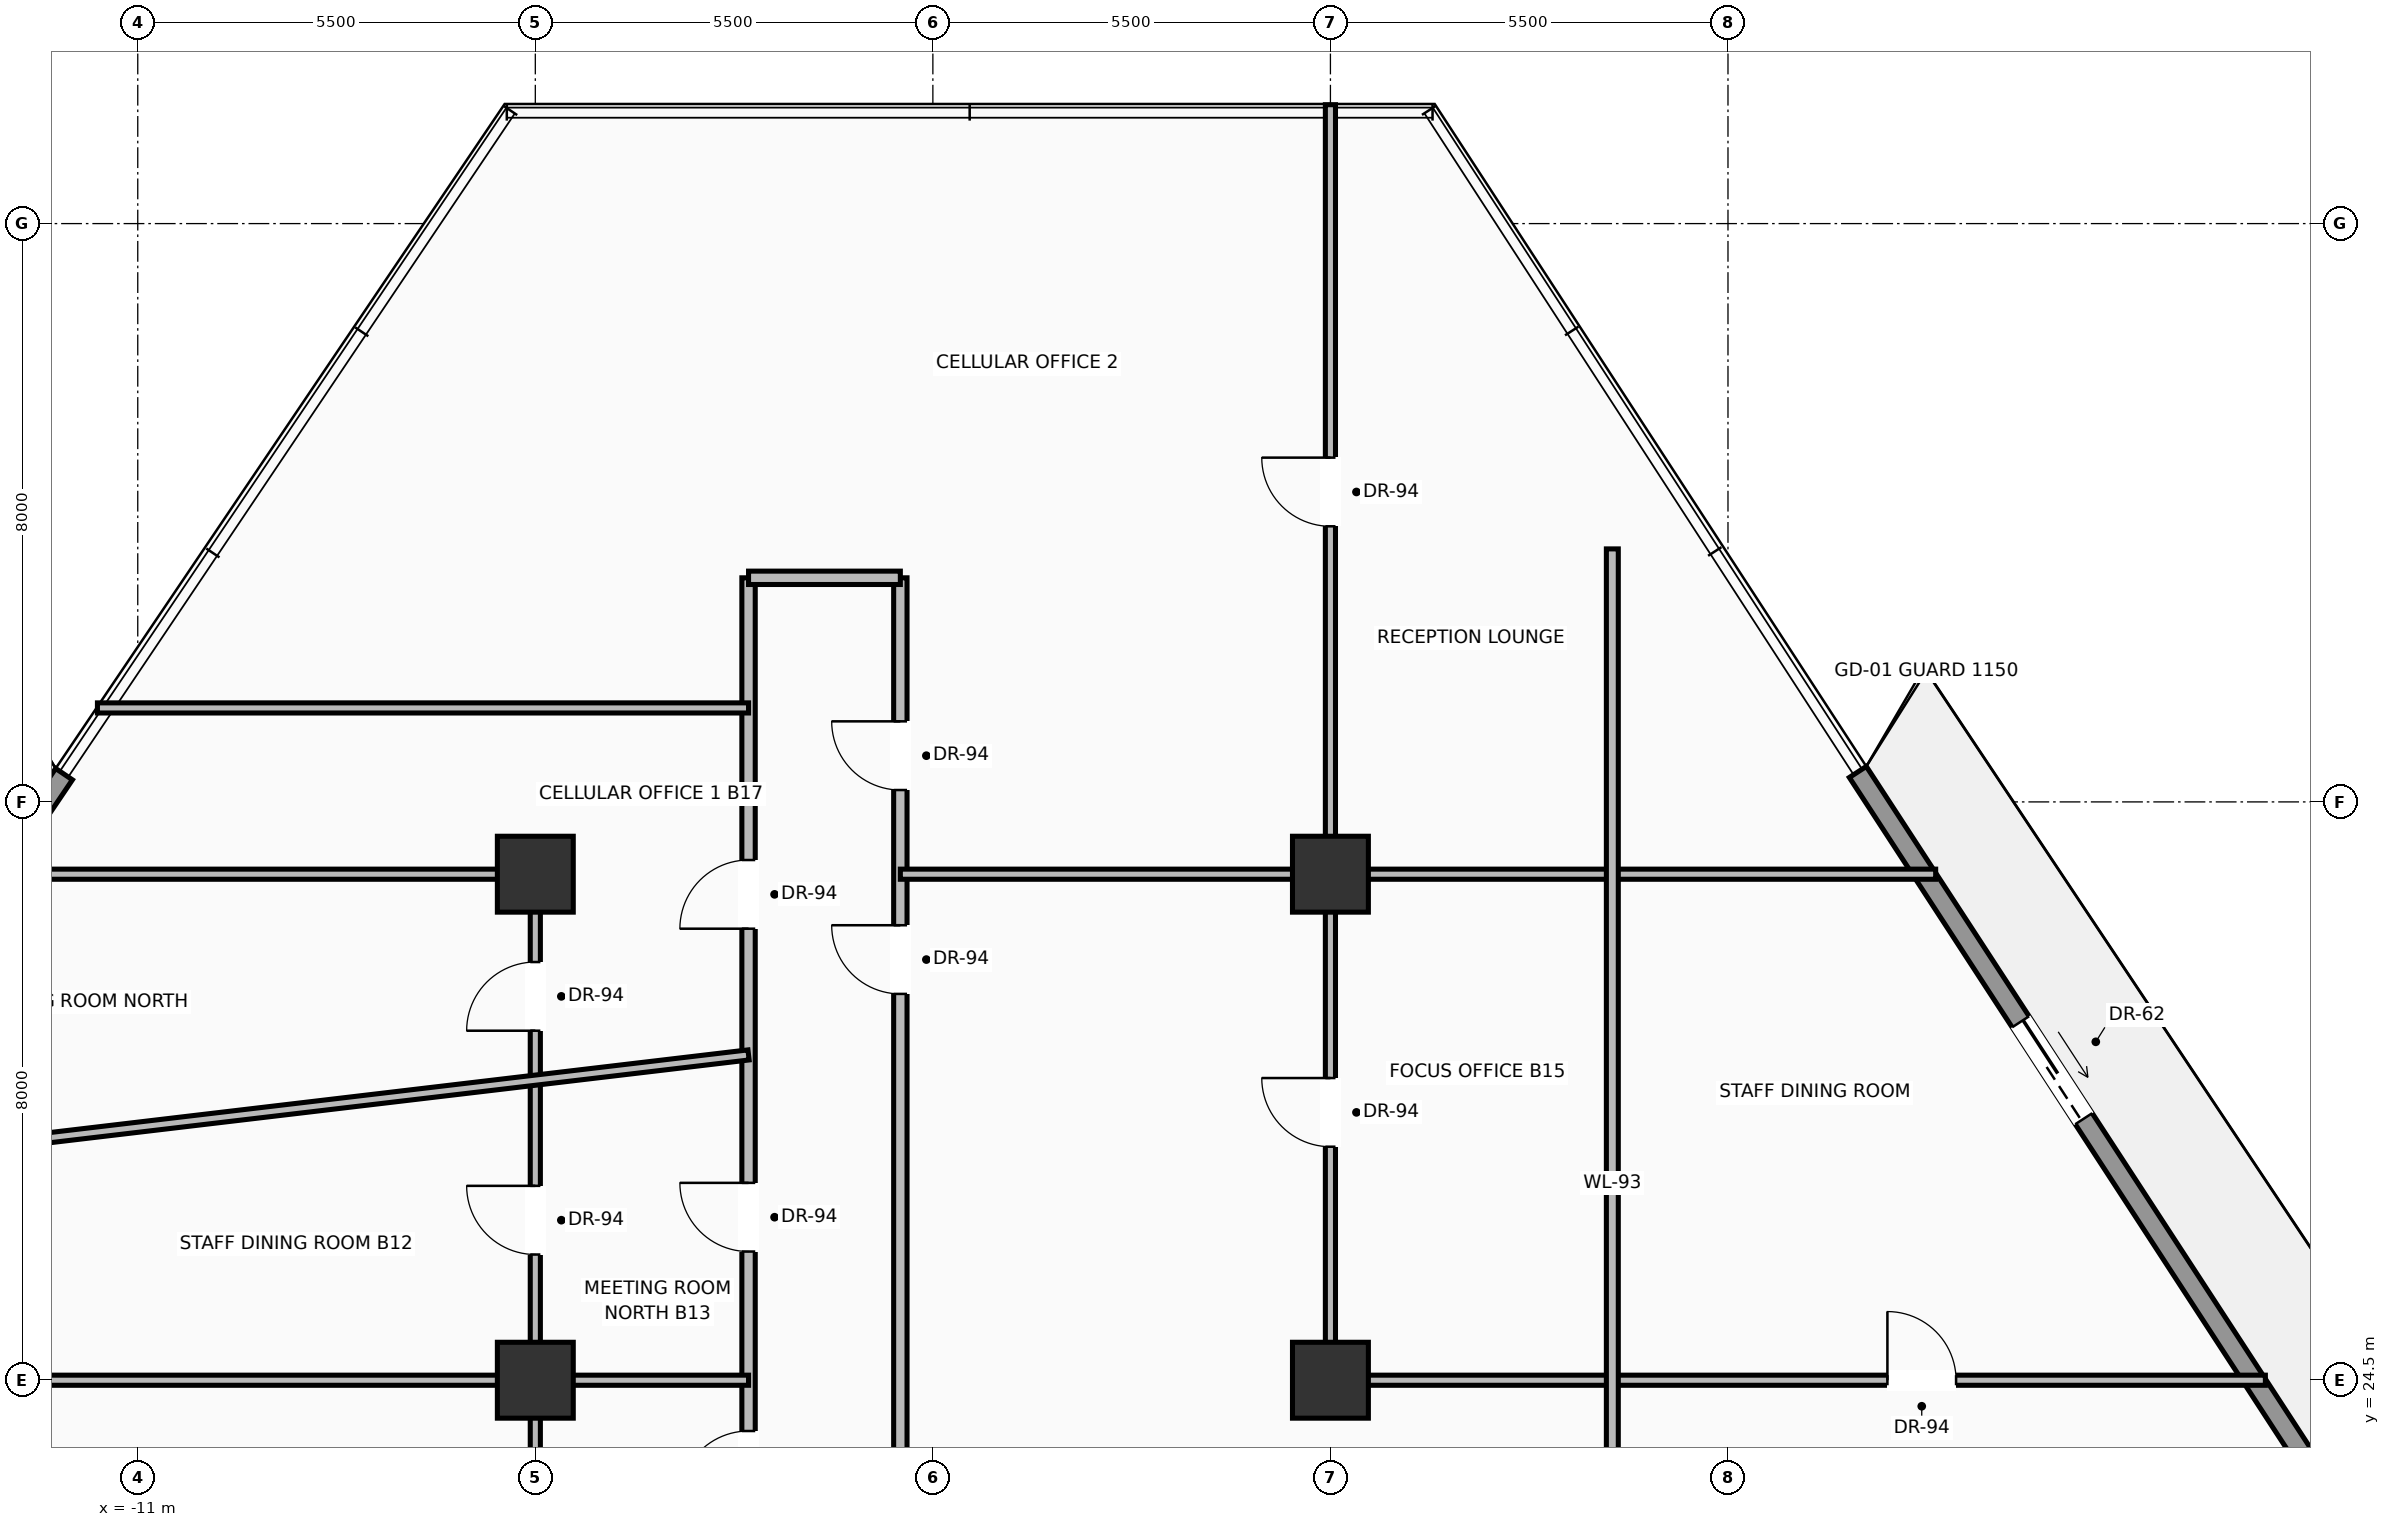
"""IFC4 building model, lengths in metres.
Left out: names, types, materials, properties, quantities, classifications, styles, units other than length and angle.
Written with IfcOpenShell. Run it as: python <this file> out.ifc"""

import sys

from ifc_helpers import new_model, si_unit, direction, frame, frame_2d, origin, origin_2d, place, context, subcontext, project, spatial, rectangle, extrude, source, transform, mapped, element, fill, save


model = new_model("IFC4")
c1 = context("Model", 3, precision=1e-05, world=origin(), true_north=direction((0.0, 1.0)))
c2 = subcontext(c1, "Body", "Model", "MODEL_VIEW")
j1 = project(units=[si_unit("LENGTHUNIT", "METRE"), si_unit("PLANEANGLEUNIT", "RADIAN")], contexts=[c1])
p1 = place(None, origin())
s1 = spatial("IfcSite", under=j1, at=p1, CompositionType="ELEMENT")
p2 = place(p1, origin())
s2 = spatial("IfcBuilding", under=s1, at=p2, CompositionType="ELEMENT")
p3 = place(p2, frame((0.0, 0.0, 84.0)))
s3 = spatial("IfcBuildingStorey", under=s2, at=p3, CompositionType="ELEMENT", Elevation=84.0)
m1 = source(origin(), c2, "Body", "SweptSolid", [
    extrude(rectangle(XDim=1.05, YDim=1.05, at=origin_2d()), origin(), (0.0, 0.0, 1.0), 3.7),
])
for number, where, z_axis, x_axis in (
    (1, (-5.5, 24.5, 0.0), (0.0, 0.0, 1.0), (1.0, 0.0, 0.0)),
    (2, (5.5, 24.5, 0.0), (0.0, 0.0, 1.0), (1.0, 0.0, 0.0)),
    (3, (-5.5, 31.5, 0.0), (0.0, 0.0, 1.0), (1.0, 0.0, 0.0)),
    (4, (5.5, 31.5, 0.0), (0.0, 0.0, 1.0), (1.0, 0.0, 0.0)),
):
    element("IfcColumn", number, at=place(p3, frame(where, z_axis=z_axis, x_axis=x_axis)), inside=s3, PredefinedType="COLUMN", context=c2, shape_type="MappedRepresentation", body=[
        mapped(m1, transform((0.0, 0.0, 0.0), scale=1.0)),
    ])
p4 = place(p3, frame((-21.781, 18.44, 0.0), z_axis=(0.0, 0.0, 1.0), x_axis=(0.559902105929, 0.828558767847, 0.0)))
e5 = element("IfcWall", 5, at=p4, inside=s3, PredefinedType="SOLIDWALL", context=c2, shape_type="SweptSolid", body=[
    extrude(rectangle(XDim=17.433, YDim=0.28, at=frame_2d((8.717, 0.0))), origin(), (0.0, 0.0, 1.0), 3.03),
])
p5 = place(p4, frame((4.184, 0.0, 0.0)))
e6 = element("IfcOpeningElement", 6, at=p5, cuts=e5, PredefinedType="OPENING", context=c2, shape_type="SweptSolid", body=[
    extrude(rectangle(XDim=1.6, YDim=2.35, at=frame_2d((0.8, 1.175))), frame((0.0, 0.15, 0.0), z_axis=(0.0, -1.0, 0.0), x_axis=(1.0, 0.0, 0.0)), (0.0, 0.0, 1.0), 0.3),
])
p6 = place(p4, frame((11.855, 0.0, 0.9)))
e7 = element("IfcOpeningElement", 7, at=p6, cuts=e5, PredefinedType="OPENING", context=c2, shape_type="SweptSolid", body=[
    extrude(rectangle(XDim=2.0, YDim=1.85, at=frame_2d((1.0, 0.925))), frame((0.0, 0.15, 0.0), z_axis=(0.0, -1.0, 0.0), x_axis=(1.0, 0.0, 0.0)), (0.0, 0.0, 1.0), 0.3),
])
p7 = place(p3, frame((12.796, 32.914, 0.0), z_axis=(0.0, 0.0, 1.0), x_axis=(0.545943631237, -0.837821909186, 0.0)))
e8 = element("IfcWall", 8, at=p7, inside=s3, PredefinedType="SOLIDWALL", context=c2, shape_type="SweptSolid", body=[
    extrude(rectangle(XDim=17.187, YDim=0.28, at=frame_2d((8.594, 0.0))), origin(), (0.0, 0.0, 1.0), 3.03),
])
p8 = place(p7, frame((4.125, 0.0, 0.0)))
e9 = element("IfcOpeningElement", 9, at=p8, cuts=e8, PredefinedType="OPENING", context=c2, shape_type="SweptSolid", body=[
    extrude(rectangle(XDim=1.6, YDim=2.35, at=frame_2d((0.8, 1.175))), frame((0.0, 0.15, 0.0), z_axis=(0.0, -1.0, 0.0), x_axis=(1.0, 0.0, 0.0)), (0.0, 0.0, 1.0), 0.3),
])
p9 = place(p7, frame((11.688, 0.0, 0.9)))
e10 = element("IfcOpeningElement", 10, at=p9, cuts=e8, PredefinedType="OPENING", context=c2, shape_type="SweptSolid", body=[
    extrude(rectangle(XDim=2.0, YDim=1.85, at=frame_2d((1.0, 0.925))), frame((0.0, 0.15, 0.0), z_axis=(0.0, -1.0, 0.0), x_axis=(1.0, 0.0, 0.0)), (0.0, 0.0, 1.0), 0.3),
])
p10 = place(p3, frame((-2.55, 18.45, 0.0), z_axis=(0.0, 0.0, 1.0), x_axis=(0.0, 1.0, 0.0)))
e11 = element("IfcWall", 11, at=p10, inside=s3, PredefinedType="PARTITIONING", context=c2, shape_type="SweptSolid", body=[
    extrude(rectangle(XDim=17.15, YDim=0.185, at=frame_2d((8.575, 0.0))), origin(), (0.0, 0.0, 1.0), 2.747),
])
p11 = place(p10, frame((4.397, 0.0, 0.0)))
e12 = element("IfcOpeningElement", 12, at=p11, cuts=e11, PredefinedType="OPENING", context=c2, shape_type="SweptSolid", body=[
    extrude(rectangle(XDim=0.95, YDim=2.2, at=frame_2d((0.475, 1.1))), frame((0.0, 0.103, 0.0), z_axis=(0.0, -1.0, 0.0), x_axis=(1.0, 0.0, 0.0)), (0.0, 0.0, 1.0), 0.205),
])
p12 = place(p10, frame((7.83, 0.0, 0.0)))
e13 = element("IfcOpeningElement", 13, at=p12, cuts=e11, PredefinedType="OPENING", context=c2, shape_type="SweptSolid", body=[
    extrude(rectangle(XDim=0.95, YDim=2.2, at=frame_2d((0.475, 1.1))), frame((0.0, 0.103, 0.0), z_axis=(0.0, -1.0, 0.0), x_axis=(1.0, 0.0, 0.0)), (0.0, 0.0, 1.0), 0.205),
])
p13 = place(p10, frame((12.296, 0.0, 0.0)))
e14 = element("IfcOpeningElement", 14, at=p13, cuts=e11, PredefinedType="OPENING", context=c2, shape_type="SweptSolid", body=[
    extrude(rectangle(XDim=0.95, YDim=2.2, at=frame_2d((0.475, 1.1))), frame((0.0, 0.103, 0.0), z_axis=(0.0, -1.0, 0.0), x_axis=(1.0, 0.0, 0.0)), (0.0, 0.0, 1.0), 0.205),
])
p14 = place(p3, frame((-0.45, 18.45, 0.0), z_axis=(0.0, 0.0, 1.0), x_axis=(0.0, 1.0, 0.0)))
e15 = element("IfcWall", 15, at=p14, inside=s3, PredefinedType="PARTITIONING", context=c2, shape_type="SweptSolid", body=[
    extrude(rectangle(XDim=17.15, YDim=0.185, at=frame_2d((8.575, 0.0))), origin(), (0.0, 0.0, 1.0), 2.747),
])
p15 = place(p14, frame((11.394, 0.0, 0.0)))
e16 = element("IfcOpeningElement", 16, at=p15, cuts=e15, PredefinedType="OPENING", context=c2, shape_type="SweptSolid", body=[
    extrude(rectangle(XDim=0.95, YDim=2.2, at=frame_2d((0.475, 1.1))), frame((0.0, 0.103, 0.0), z_axis=(0.0, -1.0, 0.0), x_axis=(1.0, 0.0, 0.0)), (0.0, 0.0, 1.0), 0.205),
])
p16 = place(p14, frame((14.214, 0.0, 0.0)))
e17 = element("IfcOpeningElement", 17, at=p16, cuts=e15, PredefinedType="OPENING", context=c2, shape_type="SweptSolid", body=[
    extrude(rectangle(XDim=0.95, YDim=2.2, at=frame_2d((0.475, 1.1))), frame((0.0, 0.103, 0.0), z_axis=(0.0, -1.0, 0.0), x_axis=(1.0, 0.0, 0.0)), (0.0, 0.0, 1.0), 0.205),
])
p17 = place(p3, frame((-2.55, 35.6, 0.0), z_axis=(0.0, 0.0, 1.0), x_axis=(1.0, 0.0, 0.0)))
e18 = element("IfcWall", 18, at=p17, inside=s3, PredefinedType="PARTITIONING", context=c2, shape_type="SweptSolid", body=[
    extrude(rectangle(XDim=2.1, YDim=0.185, at=frame_2d((1.05, 0.0))), origin(), (0.0, 0.0, 1.0), 3.442),
])
p18 = place(p3, frame((-5.5, 18.3, 0.0), z_axis=(0.0, 0.0, 1.0), x_axis=(0.0, 1.0, 0.0)))
e19 = element("IfcWall", 19, at=p18, inside=s3, PredefinedType="PARTITIONING", context=c2, shape_type="SweptSolid", body=[
    extrude(rectangle(XDim=13.2, YDim=0.14, at=frame_2d((6.6, 0.0))), origin(), (0.0, 0.0, 1.0), 2.747),
])
p19 = place(p18, frame((3.667, 0.0, 0.0)))
e20 = element("IfcOpeningElement", 20, at=p19, cuts=e19, PredefinedType="OPENING", context=c2, shape_type="SweptSolid", body=[
    extrude(rectangle(XDim=0.95, YDim=2.2, at=frame_2d((0.475, 1.1))), frame((0.0, 0.08, 0.0), z_axis=(0.0, -1.0, 0.0), x_axis=(1.0, 0.0, 0.0)), (0.0, 0.0, 1.0), 0.16),
])
p20 = place(p18, frame((7.939, 0.0, 0.0)))
e21 = element("IfcOpeningElement", 21, at=p20, cuts=e19, PredefinedType="OPENING", context=c2, shape_type="SweptSolid", body=[
    extrude(rectangle(XDim=0.95, YDim=2.2, at=frame_2d((0.475, 1.1))), frame((0.0, 0.08, 0.0), z_axis=(0.0, -1.0, 0.0), x_axis=(1.0, 0.0, 0.0)), (0.0, 0.0, 1.0), 0.16),
])
p21 = place(p18, frame((11.035, 0.0, 0.0)))
e22 = element("IfcOpeningElement", 22, at=p21, cuts=e19, PredefinedType="OPENING", context=c2, shape_type="SweptSolid", body=[
    extrude(rectangle(XDim=0.95, YDim=2.2, at=frame_2d((0.475, 1.1))), frame((0.0, 0.08, 0.0), z_axis=(0.0, -1.0, 0.0), x_axis=(1.0, 0.0, 0.0)), (0.0, 0.0, 1.0), 0.16),
])
p22 = place(p3, frame((5.5, 24.5, 0.0), z_axis=(0.0, 0.0, 1.0), x_axis=(0.0, 1.0, 0.0)))
e23 = element("IfcWall", 23, at=p22, inside=s3, PredefinedType="PARTITIONING", context=c2, shape_type="SweptSolid", body=[
    extrude(rectangle(XDim=17.645, YDim=0.14, at=frame_2d((8.822, 0.0))), origin(), (0.0, 0.0, 1.0), 2.747),
])
p23 = place(p22, frame((3.23, 0.0, 0.0)))
e24 = element("IfcOpeningElement", 24, at=p23, cuts=e23, PredefinedType="OPENING", context=c2, shape_type="SweptSolid", body=[
    extrude(rectangle(XDim=0.95, YDim=2.2, at=frame_2d((0.475, 1.1))), frame((0.0, 0.08, 0.0), z_axis=(0.0, -1.0, 0.0), x_axis=(1.0, 0.0, 0.0)), (0.0, 0.0, 1.0), 0.16),
])
p24 = place(p22, frame((11.812, 0.0, 0.0)))
e25 = element("IfcOpeningElement", 25, at=p24, cuts=e23, PredefinedType="OPENING", context=c2, shape_type="SweptSolid", body=[
    extrude(rectangle(XDim=0.95, YDim=2.2, at=frame_2d((0.475, 1.1))), frame((0.0, 0.08, 0.0), z_axis=(0.0, -1.0, 0.0), x_axis=(1.0, 0.0, 0.0)), (0.0, 0.0, 1.0), 0.16),
])
p25 = place(p3, frame((-13.112, 31.5, 0.0), z_axis=(0.0, 0.0, 1.0), x_axis=(1.0, 0.0, 0.0)))
e26 = element("IfcWall", 26, at=p25, inside=s3, PredefinedType="PARTITIONING", context=c2, shape_type="SweptSolid", body=[
    extrude(rectangle(XDim=7.612, YDim=0.14, at=frame_2d((3.806, 0.0))), origin(), (0.0, 0.0, 1.0), 2.747),
])
p26 = place(p3, frame((5.5, 24.5, 0.0), z_axis=(0.0, 0.0, 1.0), x_axis=(1.0, 0.0, 0.0)))
e27 = element("IfcWall", 27, at=p26, inside=s3, PredefinedType="PARTITIONING", context=c2, shape_type="SweptSolid", body=[
    extrude(rectangle(XDim=12.935, YDim=0.14, at=frame_2d((6.467, 0.0))), origin(), (0.0, 0.0, 1.0), 2.747),
])
p27 = place(p26, frame((7.706, 0.0, 0.0)))
e28 = element("IfcOpeningElement", 28, at=p27, cuts=e27, PredefinedType="OPENING", context=c2, shape_type="SweptSolid", body=[
    extrude(rectangle(XDim=0.95, YDim=2.2, at=frame_2d((0.475, 1.1))), frame((0.0, 0.08, 0.0), z_axis=(0.0, -1.0, 0.0), x_axis=(1.0, 0.0, 0.0)), (0.0, 0.0, 1.0), 0.16),
])
p28 = place(p3, frame((-17.843, 24.5, 0.0), z_axis=(0.0, 0.0, 1.0), x_axis=(1.0, 0.0, 0.0)))
e29 = element("IfcWall", 29, at=p28, inside=s3, PredefinedType="PARTITIONING", context=c2, shape_type="SweptSolid", body=[
    extrude(rectangle(XDim=15.292, YDim=0.14, at=frame_2d((7.646, 0.0))), origin(), (0.0, 0.0, 1.0), 2.747),
])
p29 = place(p3, frame((-15.867, 27.423, 0.0), z_axis=(0.0, 0.0, 1.0), x_axis=(0.993064088307, 0.117574302099, 0.0)))
e30 = element("IfcWall", 30, at=p29, inside=s3, PredefinedType="PARTITIONING", context=c2, shape_type="SweptSolid", body=[
    extrude(rectangle(XDim=13.41, YDim=0.14, at=frame_2d((6.705, 0.0))), origin(), (0.0, 0.0, 1.0), 2.747),
])
p30 = place(p3, frame((-11.558, 33.8, 0.0), z_axis=(0.0, 0.0, 1.0), x_axis=(1.0, 0.0, 0.0)))
e31 = element("IfcWall", 31, at=p30, inside=s3, PredefinedType="PARTITIONING", context=c2, shape_type="SweptSolid", body=[
    extrude(rectangle(XDim=9.008, YDim=0.14, at=frame_2d((4.504, 0.0))), origin(), (0.0, 0.0, 1.0), 2.747),
])
p31 = place(p3, frame((-0.45, 31.5, 0.0), z_axis=(0.0, 0.0, 1.0), x_axis=(1.0, 0.0, 0.0)))
e32 = element("IfcWall", 32, at=p31, inside=s3, PredefinedType="PARTITIONING", context=c2, shape_type="SweptSolid", body=[
    extrude(rectangle(XDim=14.323, YDim=0.14, at=frame_2d((7.162, 0.0))), origin(), (0.0, 0.0, 1.0), 2.747),
])
p32 = place(p3, frame((9.4, 18.45, 0.0), z_axis=(0.0, 0.0, 1.0), x_axis=(0.0, 1.0, 0.0)))
e33 = element("IfcWall", 33, at=p32, inside=s3, PredefinedType="PARTITIONING", context=c2, shape_type="SweptSolid", body=[
    extrude(rectangle(XDim=17.55, YDim=0.165, at=frame_2d((8.775, 0.0))), origin(), (0.0, 0.0, 1.0), 2.747),
])
m2 = source(origin(), c2, "Body", "SweptSolid", [
    extrude(rectangle(XDim=1.6, YDim=2.35, at=frame_2d((0.8, 1.175))), frame((0.0, 0.025, 0.0), z_axis=(0.0, -1.0, 0.0), x_axis=(1.0, 0.0, 0.0)), (0.0, 0.0, 1.0), 0.05),
])
p33 = place(p8, origin())
e34 = element("IfcDoor", 34, at=p33, inside=s3, OperationType="SLIDING_TO_RIGHT", PredefinedType="DOOR", context=c2, shape_type="MappedRepresentation", body=[
    mapped(m2, transform((0.0, 0.0, 0.0), scale=1.0)),
])
fill(e9, e34)
m3 = source(origin(), c2, "Body", "SweptSolid", [
    extrude(rectangle(XDim=0.95, YDim=2.2, at=frame_2d((0.475, 1.1))), frame((0.0, 0.025, 0.0), z_axis=(0.0, -1.0, 0.0), x_axis=(1.0, 0.0, 0.0)), (0.0, 0.0, 1.0), 0.05),
])
p34 = place(p11, origin())
e35 = element("IfcDoor", 35, at=p34, inside=s3, OperationType="SINGLE_SWING_LEFT", PredefinedType="DOOR", context=c2, shape_type="MappedRepresentation", body=[
    mapped(m3, transform((0.0, 0.0, 0.0), scale=1.0)),
])
fill(e12, e35)
p35 = place(p15, origin())
e36 = element("IfcDoor", 36, at=p35, inside=s3, OperationType="SINGLE_SWING_RIGHT", PredefinedType="DOOR", context=c2, shape_type="MappedRepresentation", body=[
    mapped(m3, transform((0.0, 0.0, 0.0), scale=1.0)),
])
fill(e16, e36)
p36 = place(p12, origin())
e37 = element("IfcDoor", 37, at=p36, inside=s3, OperationType="SINGLE_SWING_RIGHT", PredefinedType="DOOR", context=c2, shape_type="MappedRepresentation", body=[
    mapped(m3, transform((0.0, 0.0, 0.0), scale=1.0)),
])
fill(e13, e37)
p37 = place(p27, origin())
e38 = element("IfcDoor", 38, at=p37, inside=s3, OperationType="SINGLE_SWING_LEFT", PredefinedType="DOOR", context=c2, shape_type="MappedRepresentation", body=[
    mapped(m3, transform((0.0, 0.0, 0.0), scale=1.0)),
])
fill(e28, e38)
p38 = place(p23, origin())
e39 = element("IfcDoor", 39, at=p38, inside=s3, OperationType="SINGLE_SWING_RIGHT", PredefinedType="DOOR", context=c2, shape_type="MappedRepresentation", body=[
    mapped(m3, transform((0.0, 0.0, 0.0), scale=1.0)),
])
fill(e24, e39)
p39 = place(p13, origin())
e40 = element("IfcDoor", 40, at=p39, inside=s3, OperationType="SINGLE_SWING_LEFT", PredefinedType="DOOR", context=c2, shape_type="MappedRepresentation", body=[
    mapped(m3, transform((0.0, 0.0, 0.0), scale=1.0)),
])
fill(e14, e40)
p40 = place(p16, origin())
e41 = element("IfcDoor", 41, at=p40, inside=s3, OperationType="SINGLE_SWING_RIGHT", PredefinedType="DOOR", context=c2, shape_type="MappedRepresentation", body=[
    mapped(m3, transform((0.0, 0.0, 0.0), scale=1.0)),
])
fill(e17, e41)
p41 = place(p20, origin())
e42 = element("IfcDoor", 42, at=p41, inside=s3, OperationType="SINGLE_SWING_RIGHT", PredefinedType="DOOR", context=c2, shape_type="MappedRepresentation", body=[
    mapped(m3, transform((0.0, 0.0, 0.0), scale=1.0)),
])
fill(e21, e42)
p42 = place(p21, origin())
e43 = element("IfcDoor", 43, at=p42, inside=s3, OperationType="SINGLE_SWING_LEFT", PredefinedType="DOOR", context=c2, shape_type="MappedRepresentation", body=[
    mapped(m3, transform((0.0, 0.0, 0.0), scale=1.0)),
])
fill(e22, e43)
p43 = place(p24, origin())
e44 = element("IfcDoor", 44, at=p43, inside=s3, OperationType="SINGLE_SWING_RIGHT", PredefinedType="DOOR", context=c2, shape_type="MappedRepresentation", body=[
    mapped(m3, transform((0.0, 0.0, 0.0), scale=1.0)),
])
fill(e25, e44)
save(model, sys.argv[1])
